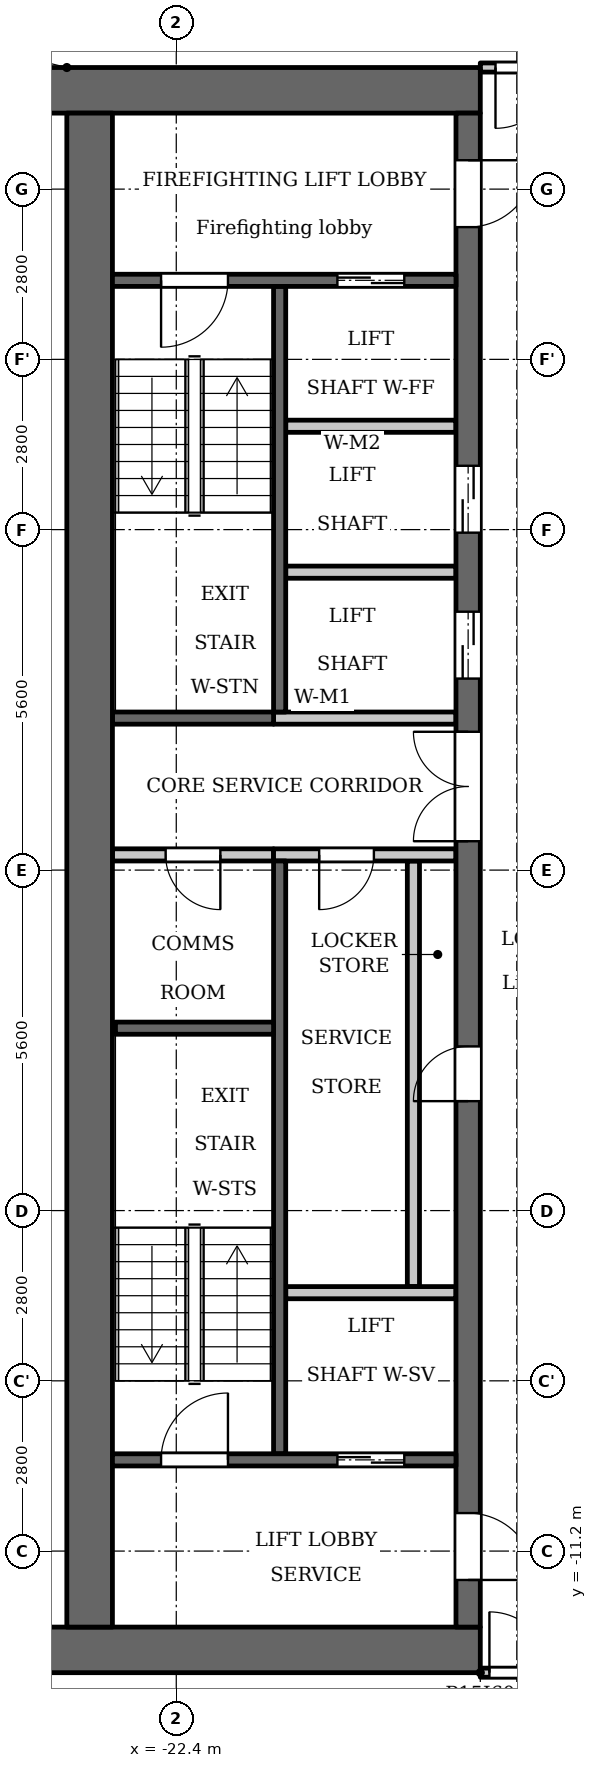
"""IFC4 building model, lengths in metres.
Left out: names, types, materials, properties, quantities, classifications, styles, units other than length and angle.
Written with IfcOpenShell. Run it as: python <this file> out.ifc"""

import sys

from ifc_helpers import new_model, si_unit, direction, frame, frame_2d, origin, place, context, subcontext, project, spatial, rectangle, extrude, element, fill, save


model = new_model("IFC4")
c1 = context("Model", 3, precision=1e-05, world=origin(), true_north=direction((0.0, 1.0)))
c2 = subcontext(c1, "Body", "Model", "MODEL_VIEW")
j1 = project(units=[si_unit("LENGTHUNIT", "METRE"), si_unit("PLANEANGLEUNIT", "RADIAN")], contexts=[c1])
p1 = place(None, origin())
s1 = spatial("IfcSite", under=j1, at=p1, CompositionType="ELEMENT")
p2 = place(p1, origin())
s2 = spatial("IfcBuilding", under=s1, at=p2, CompositionType="ELEMENT")
p3 = place(p2, frame((0.0, 0.0, 199.4)))
s3 = spatial("IfcBuildingStorey", under=s2, at=p3, CompositionType="ELEMENT", Elevation=199.4)
p4 = place(p3, frame((-20.7, 2.6, 0.0), z_axis=(0.0, 0.0, 1.0), x_axis=(0.0, 1.0, 0.0)))
e1 = element("IfcWall", 1, at=p4, inside=s3, PredefinedType="SHEAR", context=c2, shape_type="SweptSolid", body=[
    extrude(rectangle(XDim=7.0, YDim=0.2, at=frame_2d((3.5, 0.0))), origin(), (0.0, 0.0, 1.0), 3.2),
])
p5 = place(p3, frame((-20.7, -9.6, 0.0), z_axis=(0.0, 0.0, 1.0), x_axis=(0.0, 1.0, 0.0)))
e2 = element("IfcWall", 2, at=p5, inside=s3, PredefinedType="SHEAR", context=c2, shape_type="SweptSolid", body=[
    extrude(rectangle(XDim=9.75, YDim=0.2, at=frame_2d((4.875, 0.0))), origin(), (0.0, 0.0, 1.0), 3.2),
])
p6 = place(p3, frame((-20.8, 2.5, 0.0), z_axis=(0.0, 0.0, 1.0), x_axis=(-1.0, 0.0, 0.0)))
e3 = element("IfcWall", 3, at=p6, inside=s3, PredefinedType="SHEAR", context=c2, shape_type="SweptSolid", body=[
    extrude(rectangle(XDim=2.65, YDim=0.2, at=frame_2d((1.325, 0.0))), origin(), (0.0, 0.0, 1.0), 3.2),
])
p7 = place(p3, frame((-20.8, 0.25, 0.0), z_axis=(0.0, 0.0, 1.0), x_axis=(-1.0, 0.0, 0.0)))
e4 = element("IfcWall", 4, at=p7, inside=s3, PredefinedType="PARTITIONING", context=c2, shape_type="SweptSolid", body=[
    extrude(rectangle(XDim=2.65, YDim=0.2, at=frame_2d((1.325, 0.0))), origin(), (0.0, 0.0, 1.0), 3.2),
])
p8 = place(p7, frame((0.875, 0.0, 0.0)))
e5 = element("IfcOpeningElement", 5, at=p8, cuts=e4, PredefinedType="OPENING", context=c2, shape_type="SweptSolid", body=[
    extrude(rectangle(XDim=0.9, YDim=2.1, at=frame_2d((0.45, 1.05))), frame((0.0, 0.11, 0.0), z_axis=(0.0, -1.0, 0.0), x_axis=(1.0, 0.0, 0.0)), (0.0, 0.0, 1.0), 0.22),
])
for number, where, z_axis, x_axis in (
    (6, (-17.4, 12.825, 0.0), (0.0, 0.0, 1.0), (-1.0, 0.0, 0.0)),
    (7, (-17.4, -12.825, 0.0), (0.0, 0.0, 1.0), (-1.0, 0.0, 0.0)),
):
    element("IfcWall", number, at=place(p3, frame(where, z_axis=z_axis, x_axis=x_axis)), inside=s3, PredefinedType="SHEAR", context=c2, shape_type="SweptSolid", body=[
        extrude(rectangle(XDim=7.6, YDim=0.75, at=frame_2d((3.8, 0.0))), origin(), (0.0, 0.0, 1.0), 3.2),
    ])
p9 = place(p3, frame((-18.5, -6.85, 0.0), z_axis=(0.0, 0.0, 1.0), x_axis=(0.0, 1.0, 0.0)))
e8 = element("IfcWall", 8, at=p9, inside=s3, PredefinedType="PARTITIONING", context=c2, shape_type="SweptSolid", body=[
    extrude(rectangle(XDim=7.0, YDim=0.2, at=frame_2d((3.5, 0.0))), origin(), (0.0, 0.0, 1.0), 3.2),
])
p10 = place(p3, frame((-17.6, -12.45, 0.0), z_axis=(0.0, 0.0, 1.0), x_axis=(0.0, 1.0, 0.0)))
e9 = element("IfcWall", 9, at=p10, inside=s3, PredefinedType="SHEAR", context=c2, shape_type="SweptSolid", body=[
    extrude(rectangle(XDim=24.9, YDim=0.4, at=frame_2d((12.45, 0.0))), origin(), (0.0, 0.0, 1.0), 3.2),
])
p11 = place(p10, frame((8.65, 0.0, 0.0)))
e10 = element("IfcOpeningElement", 10, at=p11, cuts=e9, PredefinedType="OPENING", context=c2, shape_type="SweptSolid", body=[
    extrude(rectangle(XDim=0.9, YDim=2.1, at=frame_2d((0.45, 1.05))), frame((0.0, 0.21, 0.0), z_axis=(0.0, -1.0, 0.0), x_axis=(1.0, 0.0, 0.0)), (0.0, 0.0, 1.0), 0.42),
])
p12 = place(p10, frame((15.6, 0.0, 0.0)))
e11 = element("IfcOpeningElement", 11, at=p12, cuts=e9, PredefinedType="OPENING", context=c2, shape_type="SweptSolid", body=[
    extrude(rectangle(XDim=1.1, YDim=2.1, at=frame_2d((0.55, 1.05))), frame((0.0, 0.21, 0.0), z_axis=(0.0, -1.0, 0.0), x_axis=(1.0, 0.0, 0.0)), (0.0, 0.0, 1.0), 0.42),
])
p13 = place(p10, frame((18.0, 0.0, 0.0)))
e12 = element("IfcOpeningElement", 12, at=p13, cuts=e9, PredefinedType="OPENING", context=c2, shape_type="SweptSolid", body=[
    extrude(rectangle(XDim=1.1, YDim=2.1, at=frame_2d((0.55, 1.05))), frame((0.0, 0.21, 0.0), z_axis=(0.0, -1.0, 0.0), x_axis=(1.0, 0.0, 0.0)), (0.0, 0.0, 1.0), 0.42),
])
p14 = place(p10, frame((23.025, 0.0, 0.0)))
e13 = element("IfcOpeningElement", 13, at=p14, cuts=e9, PredefinedType="OPENING", context=c2, shape_type="SweptSolid", body=[
    extrude(rectangle(XDim=1.1, YDim=2.1, at=frame_2d((0.55, 1.05))), frame((0.0, 0.21, 0.0), z_axis=(0.0, -1.0, 0.0), x_axis=(1.0, 0.0, 0.0)), (0.0, 0.0, 1.0), 0.42),
])
p15 = place(p10, frame((0.775, 0.0, 0.0)))
e14 = element("IfcOpeningElement", 14, at=p15, cuts=e9, PredefinedType="OPENING", context=c2, shape_type="SweptSolid", body=[
    extrude(rectangle(XDim=1.1, YDim=2.1, at=frame_2d((0.55, 1.05))), frame((0.0, 0.21, 0.0), z_axis=(0.0, -1.0, 0.0), x_axis=(1.0, 0.0, 0.0)), (0.0, 0.0, 1.0), 0.42),
])
p16 = place(p10, frame((12.925, 0.0, 0.0)))
e15 = element("IfcOpeningElement", 15, at=p16, cuts=e9, PredefinedType="OPENING", context=c2, shape_type="SweptSolid", body=[
    extrude(rectangle(XDim=1.8, YDim=2.1, at=frame_2d((0.9, 1.05))), frame((0.0, 0.21, 0.0), z_axis=(0.0, -1.0, 0.0), x_axis=(1.0, 0.0, 0.0)), (0.0, 0.0, 1.0), 0.42),
])
p17 = place(p3, frame((-23.825, -12.45, 0.0), z_axis=(0.0, 0.0, 1.0), x_axis=(0.0, 1.0, 0.0)))
e16 = element("IfcWall", 16, at=p17, inside=s3, PredefinedType="SHEAR", context=c2, shape_type="SweptSolid", body=[
    extrude(rectangle(XDim=24.9, YDim=0.75, at=frame_2d((12.45, 0.0))), origin(), (0.0, 0.0, 1.0), 3.2),
])
p18 = place(p3, frame((-17.8, -9.7, 0.0), z_axis=(0.0, 0.0, 1.0), x_axis=(-1.0, 0.0, 0.0)))
e17 = element("IfcWall", 17, at=p18, inside=s3, PredefinedType="SHEAR", context=c2, shape_type="SweptSolid", body=[
    extrude(rectangle(XDim=5.65, YDim=0.2, at=frame_2d((2.825, 0.0))), origin(), (0.0, 0.0, 1.0), 3.2),
])
p19 = place(p18, frame((0.85, 0.0, 0.0)))
e18 = element("IfcOpeningElement", 18, at=p19, cuts=e17, PredefinedType="OPENING", context=c2, shape_type="SweptSolid", body=[
    extrude(rectangle(XDim=1.1, YDim=2.1, at=frame_2d((0.55, 1.05))), frame((0.0, 0.11, 0.0), z_axis=(0.0, -1.0, 0.0), x_axis=(1.0, 0.0, 0.0)), (0.0, 0.0, 1.0), 0.22),
])
p20 = place(p18, frame((3.75, 0.0, 0.0)))
e19 = element("IfcOpeningElement", 19, at=p20, cuts=e17, PredefinedType="OPENING", context=c2, shape_type="SweptSolid", body=[
    extrude(rectangle(XDim=1.1, YDim=2.1, at=frame_2d((0.55, 1.05))), frame((0.0, 0.11, 0.0), z_axis=(0.0, -1.0, 0.0), x_axis=(1.0, 0.0, 0.0)), (0.0, 0.0, 1.0), 0.22),
])
p21 = place(p3, frame((-17.8, -6.95, 0.0), z_axis=(0.0, 0.0, 1.0), x_axis=(-1.0, 0.0, 0.0)))
e20 = element("IfcWall", 20, at=p21, inside=s3, PredefinedType="PARTITIONING", context=c2, shape_type="SweptSolid", body=[
    extrude(rectangle(XDim=2.8, YDim=0.2, at=frame_2d((1.4, 0.0))), origin(), (0.0, 0.0, 1.0), 3.2),
])
p22 = place(p3, frame((-17.8, 0.25, 0.0), z_axis=(0.0, 0.0, 1.0), x_axis=(-1.0, 0.0, 0.0)))
e21 = element("IfcWall", 21, at=p22, inside=s3, PredefinedType="PARTITIONING", context=c2, shape_type="SweptSolid", body=[
    extrude(rectangle(XDim=3.0, YDim=0.2, at=frame_2d((1.5, 0.0))), origin(), (0.0, 0.0, 1.0), 3.2),
])
p23 = place(p22, frame((1.35, 0.0, 0.0)))
e22 = element("IfcOpeningElement", 22, at=p23, cuts=e21, PredefinedType="OPENING", context=c2, shape_type="SweptSolid", body=[
    extrude(rectangle(XDim=0.9, YDim=2.1, at=frame_2d((0.45, 1.05))), frame((0.0, 0.11, 0.0), z_axis=(0.0, -1.0, 0.0), x_axis=(1.0, 0.0, 0.0)), (0.0, 0.0, 1.0), 0.22),
])
p24 = place(p3, frame((-17.8, 2.5, 0.0), z_axis=(0.0, 0.0, 1.0), x_axis=(-1.0, 0.0, 0.0)))
e23 = element("IfcWall", 23, at=p24, inside=s3, PredefinedType="PARTITIONING", context=c2, shape_type="SweptSolid", body=[
    extrude(rectangle(XDim=3.0, YDim=0.2, at=frame_2d((1.5, 0.0))), origin(), (0.0, 0.0, 1.0), 3.2),
])
for number, where, z_axis, x_axis in (
    (24, (-17.8, 4.9, 0.0), (0.0, 0.0, 1.0), (-1.0, 0.0, 0.0)),
    (25, (-17.8, 7.3, 0.0), (0.0, 0.0, 1.0), (-1.0, 0.0, 0.0)),
):
    element("IfcWall", number, at=place(p3, frame(where, z_axis=z_axis, x_axis=x_axis)), inside=s3, PredefinedType="PARTITIONING", context=c2, shape_type="SweptSolid", body=[
        extrude(rectangle(XDim=2.8, YDim=0.2, at=frame_2d((1.4, 0.0))), origin(), (0.0, 0.0, 1.0), 3.2),
    ])
p25 = place(p3, frame((-17.8, 9.7, 0.0), z_axis=(0.0, 0.0, 1.0), x_axis=(-1.0, 0.0, 0.0)))
e26 = element("IfcWall", 26, at=p25, inside=s3, PredefinedType="SHEAR", context=c2, shape_type="SweptSolid", body=[
    extrude(rectangle(XDim=5.65, YDim=0.2, at=frame_2d((2.825, 0.0))), origin(), (0.0, 0.0, 1.0), 3.2),
])
p26 = place(p25, frame((0.85, 0.0, 0.0)))
e27 = element("IfcOpeningElement", 27, at=p26, cuts=e26, PredefinedType="OPENING", context=c2, shape_type="SweptSolid", body=[
    extrude(rectangle(XDim=1.1, YDim=2.1, at=frame_2d((0.55, 1.05))), frame((0.0, 0.11, 0.0), z_axis=(0.0, -1.0, 0.0), x_axis=(1.0, 0.0, 0.0)), (0.0, 0.0, 1.0), 0.22),
])
p27 = place(p25, frame((3.75, 0.0, 0.0)))
e28 = element("IfcOpeningElement", 28, at=p27, cuts=e26, PredefinedType="OPENING", context=c2, shape_type="SweptSolid", body=[
    extrude(rectangle(XDim=1.1, YDim=2.1, at=frame_2d((0.55, 1.05))), frame((0.0, 0.11, 0.0), z_axis=(0.0, -1.0, 0.0), x_axis=(1.0, 0.0, 0.0)), (0.0, 0.0, 1.0), 0.22),
])
p28 = place(p3, frame((-20.8, -2.6, 0.0), z_axis=(0.0, 0.0, 1.0), x_axis=(-1.0, 0.0, 0.0)))
e29 = element("IfcWall", 29, at=p28, inside=s3, PredefinedType="SHEAR", context=c2, shape_type="SweptSolid", body=[
    extrude(rectangle(XDim=2.6, YDim=0.2, at=frame_2d((1.3, 0.0))), origin(), (0.0, 0.0, 1.0), 3.2),
])
p29 = place(p3, frame((-17.4, -13.2, 0.0), z_axis=(0.0, 0.0, 1.0), x_axis=(1.0, 0.0, 0.0)))
e30 = element("IfcWall", 30, at=p29, inside=s3, PredefinedType="PARTITIONING", context=c2, shape_type="SweptSolid", body=[
    extrude(rectangle(XDim=34.8, YDim=0.15, at=frame_2d((17.4, 0.0))), origin(), (0.0, 0.0, 1.0), 3.2),
])
p30 = place(p29, frame((0.15, 0.0, 0.0)))
e31 = element("IfcOpeningElement", 31, at=p30, cuts=e30, PredefinedType="OPENING", context=c2, shape_type="SweptSolid", body=[
    extrude(rectangle(XDim=1.0, YDim=2.1, at=frame_2d((0.5, 1.05))), frame((0.0, 0.085, 0.0), z_axis=(0.0, -1.0, 0.0), x_axis=(1.0, 0.0, 0.0)), (0.0, 0.0, 1.0), 0.17),
])
p31 = place(p29, frame((33.55, 0.0, 0.0)))
e32 = element("IfcOpeningElement", 32, at=p31, cuts=e30, PredefinedType="OPENING", context=c2, shape_type="SweptSolid", body=[
    extrude(rectangle(XDim=1.0, YDim=2.1, at=frame_2d((0.5, 1.05))), frame((0.0, 0.085, 0.0), z_axis=(0.0, -1.0, 0.0), x_axis=(1.0, 0.0, 0.0)), (0.0, 0.0, 1.0), 0.17),
])
p32 = place(p3, frame((-17.4, 13.2, 0.0), z_axis=(0.0, 0.0, 1.0), x_axis=(1.0, 0.0, 0.0)))
e33 = element("IfcWall", 33, at=p32, inside=s3, PredefinedType="PARTITIONING", context=c2, shape_type="SweptSolid", body=[
    extrude(rectangle(XDim=34.8, YDim=0.15, at=frame_2d((17.4, 0.0))), origin(), (0.0, 0.0, 1.0), 3.2),
])
p33 = place(p32, frame((0.25, 0.0, 0.0)))
e34 = element("IfcOpeningElement", 34, at=p33, cuts=e33, PredefinedType="OPENING", context=c2, shape_type="SweptSolid", body=[
    extrude(rectangle(XDim=1.0, YDim=2.1, at=frame_2d((0.5, 1.05))), frame((0.0, 0.085, 0.0), z_axis=(0.0, -1.0, 0.0), x_axis=(1.0, 0.0, 0.0)), (0.0, 0.0, 1.0), 0.17),
])
p34 = place(p32, frame((33.65, 0.0, 0.0)))
e35 = element("IfcOpeningElement", 35, at=p34, cuts=e33, PredefinedType="OPENING", context=c2, shape_type="SweptSolid", body=[
    extrude(rectangle(XDim=1.0, YDim=2.1, at=frame_2d((0.5, 1.05))), frame((0.0, 0.085, 0.0), z_axis=(0.0, -1.0, 0.0), x_axis=(1.0, 0.0, 0.0)), (0.0, 0.0, 1.0), 0.17),
])
p35 = place(p19, origin())
e36 = element("IfcDoor", 36, at=p35, inside=s3, OperationType="DOUBLE_DOOR_SLIDING", PredefinedType="DOOR", context=c2, shape_type="SweptSolid", body=[
    extrude(rectangle(XDim=1.1, YDim=2.1, at=frame_2d((0.55, 1.05))), frame((0.0, 0.025, 0.0), z_axis=(0.0, -1.0, 0.0), x_axis=(1.0, 0.0, 0.0)), (0.0, 0.0, 1.0), 0.05),
])
fill(e18, e36)
p36 = place(p11, origin())
e37 = element("IfcDoor", 37, at=p36, inside=s3, OperationType="SINGLE_SWING_RIGHT", PredefinedType="DOOR", context=c2, shape_type="SweptSolid", body=[
    extrude(rectangle(XDim=0.9, YDim=2.1, at=frame_2d((0.45, 1.05))), frame((0.0, 0.025, 0.0), z_axis=(0.0, -1.0, 0.0), x_axis=(1.0, 0.0, 0.0)), (0.0, 0.0, 1.0), 0.05),
])
fill(e10, e37)
p37 = place(p23, origin())
e38 = element("IfcDoor", 38, at=p37, inside=s3, OperationType="SINGLE_SWING_LEFT", PredefinedType="DOOR", context=c2, shape_type="SweptSolid", body=[
    extrude(rectangle(XDim=0.9, YDim=2.1, at=frame_2d((0.45, 1.05))), frame((0.0, 0.025, 0.0), z_axis=(0.0, -1.0, 0.0), x_axis=(1.0, 0.0, 0.0)), (0.0, 0.0, 1.0), 0.05),
])
fill(e22, e38)
p38 = place(p12, origin())
e39 = element("IfcDoor", 39, at=p38, inside=s3, OperationType="DOUBLE_DOOR_SLIDING", PredefinedType="DOOR", context=c2, shape_type="SweptSolid", body=[
    extrude(rectangle(XDim=1.1, YDim=2.1, at=frame_2d((0.55, 1.05))), frame((0.0, 0.025, 0.0), z_axis=(0.0, -1.0, 0.0), x_axis=(1.0, 0.0, 0.0)), (0.0, 0.0, 1.0), 0.05),
])
fill(e11, e39)
p39 = place(p13, origin())
e40 = element("IfcDoor", 40, at=p39, inside=s3, OperationType="DOUBLE_DOOR_SLIDING", PredefinedType="DOOR", context=c2, shape_type="SweptSolid", body=[
    extrude(rectangle(XDim=1.1, YDim=2.1, at=frame_2d((0.55, 1.05))), frame((0.0, 0.025, 0.0), z_axis=(0.0, -1.0, 0.0), x_axis=(1.0, 0.0, 0.0)), (0.0, 0.0, 1.0), 0.05),
])
fill(e12, e40)
p40 = place(p26, origin())
e41 = element("IfcDoor", 41, at=p40, inside=s3, OperationType="DOUBLE_DOOR_SLIDING", PredefinedType="DOOR", context=c2, shape_type="SweptSolid", body=[
    extrude(rectangle(XDim=1.1, YDim=2.1, at=frame_2d((0.55, 1.05))), frame((0.0, 0.025, 0.0), z_axis=(0.0, -1.0, 0.0), x_axis=(1.0, 0.0, 0.0)), (0.0, 0.0, 1.0), 0.05),
])
fill(e27, e41)
p41 = place(p14, origin())
e42 = element("IfcDoor", 42, at=p41, inside=s3, OperationType="SINGLE_SWING_RIGHT", PredefinedType="DOOR", context=c2, shape_type="SweptSolid", body=[
    extrude(rectangle(XDim=1.1, YDim=2.1, at=frame_2d((0.55, 1.05))), frame((0.0, 0.025, 0.0), z_axis=(0.0, -1.0, 0.0), x_axis=(1.0, 0.0, 0.0)), (0.0, 0.0, 1.0), 0.05),
])
fill(e13, e42)
p42 = place(p15, origin())
e43 = element("IfcDoor", 43, at=p42, inside=s3, OperationType="SINGLE_SWING_LEFT", PredefinedType="DOOR", context=c2, shape_type="SweptSolid", body=[
    extrude(rectangle(XDim=1.1, YDim=2.1, at=frame_2d((0.55, 1.05))), frame((0.0, 0.025, 0.0), z_axis=(0.0, -1.0, 0.0), x_axis=(1.0, 0.0, 0.0)), (0.0, 0.0, 1.0), 0.05),
])
fill(e14, e43)
p43 = place(p27, origin())
e44 = element("IfcDoor", 44, at=p43, inside=s3, OperationType="SINGLE_SWING_LEFT", PredefinedType="DOOR", context=c2, shape_type="SweptSolid", body=[
    extrude(rectangle(XDim=1.1, YDim=2.1, at=frame_2d((0.55, 1.05))), frame((0.0, 0.025, 0.0), z_axis=(0.0, -1.0, 0.0), x_axis=(1.0, 0.0, 0.0)), (0.0, 0.0, 1.0), 0.05),
])
fill(e28, e44)
p44 = place(p20, origin())
e45 = element("IfcDoor", 45, at=p44, inside=s3, OperationType="SINGLE_SWING_LEFT", PredefinedType="DOOR", context=c2, shape_type="SweptSolid", body=[
    extrude(rectangle(XDim=1.1, YDim=2.1, at=frame_2d((0.55, 1.05))), frame((0.0, 0.025, 0.0), z_axis=(0.0, -1.0, 0.0), x_axis=(1.0, 0.0, 0.0)), (0.0, 0.0, 1.0), 0.05),
])
fill(e19, e45)
p45 = place(p16, origin())
e46 = element("IfcDoor", 46, at=p45, inside=s3, OperationType="DOUBLE_DOOR_SINGLE_SWING", PredefinedType="DOOR", context=c2, shape_type="SweptSolid", body=[
    extrude(rectangle(XDim=1.8, YDim=2.1, at=frame_2d((0.9, 1.05))), frame((0.0, 0.025, 0.0), z_axis=(0.0, -1.0, 0.0), x_axis=(1.0, 0.0, 0.0)), (0.0, 0.0, 1.0), 0.05),
])
fill(e15, e46)
p46 = place(p8, origin())
e47 = element("IfcDoor", 47, at=p46, inside=s3, OperationType="SINGLE_SWING_RIGHT", PredefinedType="DOOR", context=c2, shape_type="SweptSolid", body=[
    extrude(rectangle(XDim=0.9, YDim=2.1, at=frame_2d((0.45, 1.05))), frame((0.0, 0.025, 0.0), z_axis=(0.0, -1.0, 0.0), x_axis=(1.0, 0.0, 0.0)), (0.0, 0.0, 1.0), 0.05),
])
fill(e5, e47)
p47 = place(p33, origin())
e48 = element("IfcDoor", 48, at=p47, inside=s3, OperationType="SINGLE_SWING_LEFT", PredefinedType="DOOR", context=c2, shape_type="SweptSolid", body=[
    extrude(rectangle(XDim=1.0, YDim=2.1, at=frame_2d((0.5, 1.05))), frame((0.0, 0.025, 0.0), z_axis=(0.0, -1.0, 0.0), x_axis=(1.0, 0.0, 0.0)), (0.0, 0.0, 1.0), 0.05),
])
fill(e34, e48)
p48 = place(p30, origin())
e49 = element("IfcDoor", 49, at=p48, inside=s3, OperationType="SINGLE_SWING_RIGHT", PredefinedType="DOOR", context=c2, shape_type="SweptSolid", body=[
    extrude(rectangle(XDim=1.0, YDim=2.1, at=frame_2d((0.5, 1.05))), frame((0.0, 0.025, 0.0), z_axis=(0.0, -1.0, 0.0), x_axis=(1.0, 0.0, 0.0)), (0.0, 0.0, 1.0), 0.05),
])
fill(e31, e49)
save(model, sys.argv[1])
